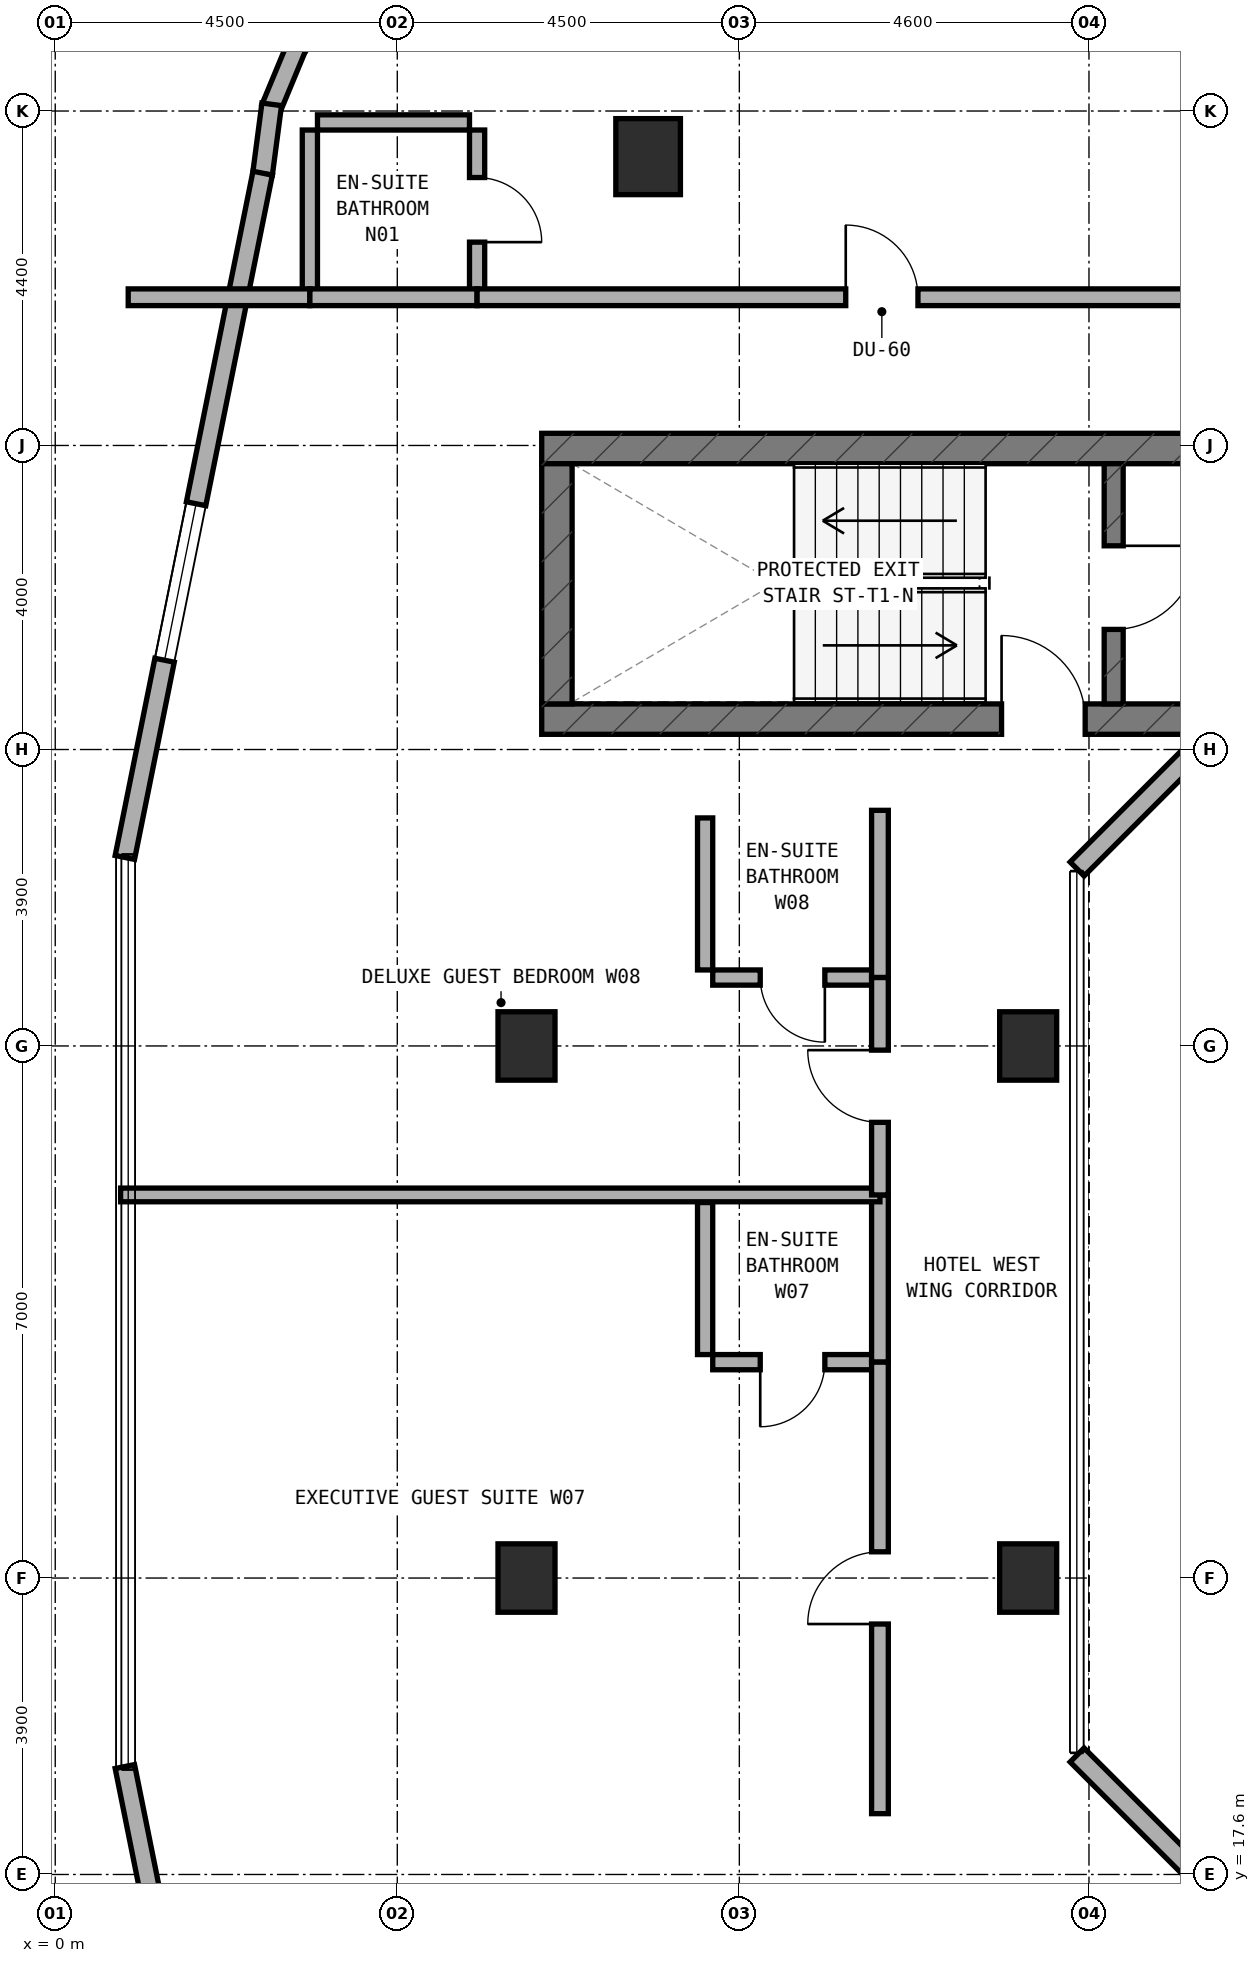
"""IFC4 building model, lengths in metres.
Left out: names, types, materials, properties, quantities, classifications, styles, units other than length and angle.
Written with IfcOpenShell. Run it as: python <this file> out.ifc"""

import sys

from ifc_helpers import new_model, si_unit, direction, frame, frame_2d, origin, origin_2d, place, context, subcontext, project, spatial, rectangle, extrude, element, fill, save


model = new_model("IFC4")
c1 = context("Model", 3, precision=1e-05, world=origin(), true_north=direction((0.0, 1.0)))
c2 = subcontext(c1, "Body", "Model", "MODEL_VIEW")
j1 = project(units=[si_unit("LENGTHUNIT", "METRE"), si_unit("PLANEANGLEUNIT", "RADIAN")], contexts=[c1])
p1 = place(None, origin())
s1 = spatial("IfcSite", under=j1, at=p1, CompositionType="ELEMENT")
p2 = place(p1, origin())
s2 = spatial("IfcBuilding", under=s1, at=p2, CompositionType="ELEMENT")
p3 = place(p2, frame((0.0, 0.0, 145.0)))
s3 = spatial("IfcBuildingStorey", under=s2, at=p3, CompositionType="ELEMENT", Elevation=145.0)
p4 = place(p3, frame((6.4, 32.8, 0.0), z_axis=(0.0, 0.0, 1.0), x_axis=(1.0, 0.0, 0.0)))
e1 = element("IfcWall", 1, at=p4, inside=s3, PredefinedType="SHEAR", context=c2, shape_type="SweptSolid", body=[
    extrude(rectangle(XDim=24.4, YDim=0.4, at=frame_2d((12.2, 0.0))), origin(), (0.0, 0.0, 1.0), 3.5),
])
p5 = place(p4, frame((6.05, 0.0, 0.0)))
e2 = element("IfcOpeningElement", 2, at=p5, cuts=e1, PredefinedType="OPENING", context=c2, shape_type="SweptSolid", body=[
    extrude(rectangle(XDim=1.1, YDim=2.15, at=frame_2d((0.55, 1.075))), frame((0.0, 0.21, 0.0), z_axis=(0.0, -1.0, 0.0), x_axis=(1.0, 0.0, 0.0)), (0.0, 0.0, 1.0), 0.42),
])
p6 = place(p3, frame((6.4, 36.36, 0.0), z_axis=(0.0, 0.0, 1.0), x_axis=(1.0, 0.0, 0.0)))
e3 = element("IfcWall", 3, at=p6, inside=s3, PredefinedType="SHEAR", context=c2, shape_type="SweptSolid", body=[
    extrude(rectangle(XDim=24.4, YDim=0.4, at=frame_2d((12.2, 0.0))), origin(), (0.0, 0.0, 1.0), 3.5),
])
p7 = place(p6, frame((9.15, 0.0, 0.0)))
e4 = element("IfcOpeningElement", 4, at=p7, cuts=e3, PredefinedType="OPENING", context=c2, shape_type="SweptSolid", body=[
    extrude(rectangle(XDim=1.2, YDim=2.15, at=frame_2d((0.6, 1.075))), frame((0.0, 0.21, 0.0), z_axis=(0.0, -1.0, 0.0), x_axis=(1.0, 0.0, 0.0)), (0.0, 0.0, 1.0), 0.42),
])
p8 = place(p6, frame((19.2, 0.0, 0.0)))
e5 = element("IfcOpeningElement", 5, at=p8, cuts=e3, PredefinedType="OPENING", context=c2, shape_type="SweptSolid", body=[
    extrude(rectangle(XDim=0.85, YDim=2.1, at=frame_2d((0.425, 1.05))), frame((0.0, 0.21, 0.0), z_axis=(0.0, -1.0, 0.0), x_axis=(1.0, 0.0, 0.0)), (0.0, 0.0, 1.0), 0.42),
])
p9 = place(p6, frame((17.22, 0.0, 0.0)))
e6 = element("IfcOpeningElement", 6, at=p9, cuts=e3, PredefinedType="OPENING", context=c2, shape_type="SweptSolid", body=[
    extrude(rectangle(XDim=0.85, YDim=2.1, at=frame_2d((0.425, 1.05))), frame((0.0, 0.21, 0.0), z_axis=(0.0, -1.0, 0.0), x_axis=(1.0, 0.0, 0.0)), (0.0, 0.0, 1.0), 0.42),
])
p10 = place(p3, frame((6.6, 33.0, 0.0), z_axis=(0.0, 0.0, 1.0), x_axis=(0.0, 1.0, 0.0)))
e7 = element("IfcWall", 7, at=p10, inside=s3, PredefinedType="SHEAR", context=c2, shape_type="SweptSolid", body=[
    extrude(rectangle(XDim=3.16, YDim=0.4, at=frame_2d((1.58, 0.0))), origin(), (0.0, 0.0, 1.0), 3.5),
])
p11 = place(p3, frame((13.925, 33.0, 0.0), z_axis=(0.0, 0.0, 1.0), x_axis=(0.0, 1.0, 0.0)))
e8 = element("IfcWall", 8, at=p11, inside=s3, PredefinedType="STANDARD", context=c2, shape_type="SweptSolid", body=[
    extrude(rectangle(XDim=3.16, YDim=0.25, at=frame_2d((1.58, 0.0))), origin(), (0.0, 0.0, 1.0), 3.22),
])
p12 = place(p11, frame((0.98, 0.0, 0.0)))
e9 = element("IfcOpeningElement", 9, at=p12, cuts=e8, PredefinedType="OPENING", context=c2, shape_type="SweptSolid", body=[
    extrude(rectangle(XDim=1.1, YDim=2.15, at=frame_2d((0.55, 1.075))), frame((0.0, 0.135, 0.0), z_axis=(0.0, -1.0, 0.0), x_axis=(1.0, 0.0, 0.0)), (0.0, 0.0, 1.0), 0.27),
])
for number, where, z_axis, x_axis in (
    (10, (6.2, 21.5, 0.0), (0.0, 0.0, 1.0), (1.0, 0.0, 0.0)),
    (11, (6.2, 28.5, 0.0), (0.0, 0.0, 1.0), (1.0, 0.0, 0.0)),
):
    element("IfcColumn", number, at=place(p3, frame(where, z_axis=z_axis, x_axis=x_axis)), inside=s3, PredefinedType="COLUMN", context=c2, shape_type="SweptSolid", body=[
        extrude(rectangle(XDim=0.75, YDim=0.9, at=origin_2d()), origin(), (0.0, 0.0, 1.0), 3.5),
    ])
p13 = place(p3, frame((7.8, 40.2, 0.0), z_axis=(0.0, 0.0, 1.0), x_axis=(1.0, 0.0, 0.0)))
e12 = element("IfcColumn", 12, at=p13, inside=s3, PredefinedType="COLUMN", context=c2, shape_type="SweptSolid", body=[
    extrude(rectangle(XDim=0.85, YDim=1.0, at=origin_2d()), origin(), (0.0, 0.0, 1.0), 3.5),
])
for number, where, z_axis, x_axis in (
    (13, (12.8, 21.5, 0.0), (0.0, 0.0, 1.0), (1.0, 0.0, 0.0)),
    (14, (12.8, 28.5, 0.0), (0.0, 0.0, 1.0), (1.0, 0.0, 0.0)),
):
    element("IfcColumn", number, at=place(p3, frame(where, z_axis=z_axis, x_axis=x_axis)), inside=s3, PredefinedType="COLUMN", context=c2, shape_type="SweptSolid", body=[
        extrude(rectangle(XDim=0.75, YDim=0.9, at=origin_2d()), origin(), (0.0, 0.0, 1.0), 3.5),
    ])
p14 = place(p3, frame((3.714, 42.345, 0.0), z_axis=(0.0, 0.0, 1.0), x_axis=(-0.608494022858, -0.793558456666, 0.0)))
e15 = element("IfcWall", 15, at=p14, inside=s3, PredefinedType="STANDARD", context=c2, shape_type="SweptSolid", body=[
    extrude(rectangle(XDim=0.902, YDim=0.26, at=frame_2d((0.451, 0.0))), origin(), (0.0, 0.0, 1.0), 3.22),
])
p15 = place(p3, frame((3.186, 41.673, 0.0), z_axis=(0.0, 0.0, 1.0), x_axis=(-0.383155708213, -0.923683767999, 0.0)))
e16 = element("IfcWall", 16, at=p15, inside=s3, PredefinedType="STANDARD", context=c2, shape_type="SweptSolid", body=[
    extrude(rectangle(XDim=0.903, YDim=0.26, at=frame_2d((0.451, 0.0))), origin(), (0.0, 0.0, 1.0), 3.22),
])
p16 = place(p3, frame((2.848, 40.888, 0.0), z_axis=(0.0, 0.0, 1.0), x_axis=(-0.130200706103, -0.991487658083, 0.0)))
e17 = element("IfcWall", 17, at=p16, inside=s3, PredefinedType="STANDARD", context=c2, shape_type="SweptSolid", body=[
    extrude(rectangle(XDim=0.921, YDim=0.26, at=frame_2d((0.46, 0.0))), origin(), (0.0, 0.0, 1.0), 3.22),
])
p17 = place(p3, frame((2.729, 39.982, 0.0), z_axis=(0.0, 0.0, 1.0), x_axis=(-0.197435082048, -0.980315963543, 0.0)))
e18 = element("IfcWall", 18, at=p17, inside=s3, PredefinedType="STANDARD", context=c2, shape_type="SweptSolid", body=[
    extrude(rectangle(XDim=9.183, YDim=0.26, at=frame_2d((4.591, 0.0))), origin(), (0.0, 0.0, 1.0), 3.22),
])
p18 = place(p17, frame((4.436, 0.0, 0.85)))
e19 = element("IfcOpeningElement", 19, at=p18, cuts=e18, PredefinedType="OPENING", context=c2, shape_type="SweptSolid", body=[
    extrude(rectangle(XDim=2.1, YDim=1.5, at=frame_2d((1.05, 0.75))), frame((0.0, 0.14, 0.0), z_axis=(0.0, -1.0, 0.0), x_axis=(1.0, 0.0, 0.0)), (0.0, 0.0, 1.0), 0.28),
])
p19 = place(p3, frame((0.916, 19.02, 0.0), z_axis=(0.0, 0.0, 1.0), x_axis=(0.197435082048, -0.980315963543, 0.0)))
e20 = element("IfcWall", 20, at=p19, inside=s3, PredefinedType="STANDARD", context=c2, shape_type="SweptSolid", body=[
    extrude(rectangle(XDim=9.183, YDim=0.26, at=frame_2d((4.591, 0.0))), origin(), (0.0, 0.0, 1.0), 3.22),
])
p20 = place(p19, frame((2.647, 0.0, 0.85)))
e21 = element("IfcOpeningElement", 21, at=p20, cuts=e20, PredefinedType="OPENING", context=c2, shape_type="SweptSolid", body=[
    extrude(rectangle(XDim=2.1, YDim=1.5, at=frame_2d((1.05, 0.75))), frame((0.0, 0.14, 0.0), z_axis=(0.0, -1.0, 0.0), x_axis=(1.0, 0.0, 0.0)), (0.0, 0.0, 1.0), 0.28),
])
for number, where, z_axis, x_axis in (
    (22, (15.278, 32.662, 0.0), (0.0, 0.0, 1.0), (-0.707, -0.707, 0.0)),
    (23, (13.444, 19.172, 0.0), (0.0, 0.0, 1.0), (0.707, -0.707, 0.0)),
):
    element("IfcWall", number, at=place(p3, frame(where, z_axis=z_axis, x_axis=x_axis)), inside=s3, PredefinedType="STANDARD", context=c2, shape_type="SweptSolid", body=[
        extrude(rectangle(XDim=2.594, YDim=0.26, at=frame_2d((1.297, 0.0))), origin(), (0.0, 0.0, 1.0), 3.22),
    ])
p21 = place(p3, frame((5.55, 38.45, 0.0), z_axis=(0.0, 0.0, 1.0), x_axis=(0.0, 1.0, 0.0)))
e24 = element("IfcWall", 24, at=p21, inside=s3, PredefinedType="PLUMBINGWALL", context=c2, shape_type="SweptSolid", body=[
    extrude(rectangle(XDim=2.1, YDim=0.2, at=frame_2d((1.05, 0.0))), origin(), (0.0, 0.0, 1.0), 3.22),
])
p22 = place(p21, frame((0.625, 0.0, 0.0)))
e25 = element("IfcOpeningElement", 25, at=p22, cuts=e24, PredefinedType="OPENING", context=c2, shape_type="SweptSolid", body=[
    extrude(rectangle(XDim=0.85, YDim=2.1, at=frame_2d((0.425, 1.05))), frame((0.0, 0.11, 0.0), z_axis=(0.0, -1.0, 0.0), x_axis=(1.0, 0.0, 0.0)), (0.0, 0.0, 1.0), 0.22),
])
p23 = place(p3, frame((3.45, 40.65, 0.0), z_axis=(0.0, 0.0, 1.0), x_axis=(1.0, 0.0, 0.0)))
e26 = element("IfcWall", 26, at=p23, inside=s3, PredefinedType="PLUMBINGWALL", context=c2, shape_type="SweptSolid", body=[
    extrude(rectangle(XDim=2.0, YDim=0.2, at=frame_2d((1.0, 0.0))), origin(), (0.0, 0.0, 1.0), 3.22),
])
p24 = place(p3, frame((3.35, 38.45, 0.0), z_axis=(0.0, 0.0, 1.0), x_axis=(0.0, 1.0, 0.0)))
e27 = element("IfcWall", 27, at=p24, inside=s3, PredefinedType="PLUMBINGWALL", context=c2, shape_type="SweptSolid", body=[
    extrude(rectangle(XDim=2.1, YDim=0.2, at=frame_2d((1.05, 0.0))), origin(), (0.0, 0.0, 1.0), 3.22),
])
p25 = place(p3, frame((0.96, 38.35, 0.0), z_axis=(0.0, 0.0, 1.0), x_axis=(1.0, 0.0, 0.0)))
e28 = element("IfcWall", 28, at=p25, inside=s3, PredefinedType="SOLIDWALL", context=c2, shape_type="SweptSolid", body=[
    extrude(rectangle(XDim=2.39, YDim=0.22, at=frame_2d((1.195, 0.0))), origin(), (0.0, 0.0, 1.0), 3.22),
])
p26 = place(p3, frame((3.35, 38.35, 0.0), z_axis=(0.0, 0.0, 1.0), x_axis=(1.0, 0.0, 0.0)))
e29 = element("IfcWall", 29, at=p26, inside=s3, PredefinedType="SOLIDWALL", context=c2, shape_type="SweptSolid", body=[
    extrude(rectangle(XDim=2.2, YDim=0.22, at=frame_2d((1.1, 0.0))), origin(), (0.0, 0.0, 1.0), 3.22),
])
p27 = place(p3, frame((5.55, 38.35, 0.0), z_axis=(0.0, 0.0, 1.0), x_axis=(1.0, 0.0, 0.0)))
e30 = element("IfcWall", 30, at=p27, inside=s3, PredefinedType="SOLIDWALL", context=c2, shape_type="SweptSolid", body=[
    extrude(rectangle(XDim=10.65, YDim=0.22, at=frame_2d((5.325, 0.0))), origin(), (0.0, 0.0, 1.0), 2.795),
])
p28 = place(p27, frame((4.85, 0.0, 0.0)))
e31 = element("IfcOpeningElement", 31, at=p28, cuts=e30, PredefinedType="OPENING", context=c2, shape_type="SweptSolid", body=[
    extrude(rectangle(XDim=0.95, YDim=2.1, at=frame_2d((0.475, 1.05))), frame((0.0, 0.12, 0.0), z_axis=(0.0, -1.0, 0.0), x_axis=(1.0, 0.0, 0.0)), (0.0, 0.0, 1.0), 0.24),
])
p29 = place(p3, frame((8.65, 24.34, 0.0), z_axis=(0.0, 0.0, 1.0), x_axis=(1.0, 0.0, 0.0)))
e32 = element("IfcWall", 32, at=p29, inside=s3, PredefinedType="PLUMBINGWALL", context=c2, shape_type="SweptSolid", body=[
    extrude(rectangle(XDim=2.1, YDim=0.2, at=frame_2d((1.05, 0.0))), origin(), (0.0, 0.0, 1.0), 3.22),
])
p30 = place(p29, frame((0.625, 0.0, 0.0)))
e33 = element("IfcOpeningElement", 33, at=p30, cuts=e32, PredefinedType="OPENING", context=c2, shape_type="SweptSolid", body=[
    extrude(rectangle(XDim=0.85, YDim=2.1, at=frame_2d((0.425, 1.05))), frame((0.0, 0.11, 0.0), z_axis=(0.0, -1.0, 0.0), x_axis=(1.0, 0.0, 0.0)), (0.0, 0.0, 1.0), 0.22),
])
p31 = place(p3, frame((8.55, 24.44, 0.0), z_axis=(0.0, 0.0, 1.0), x_axis=(0.0, 1.0, 0.0)))
e34 = element("IfcWall", 34, at=p31, inside=s3, PredefinedType="PLUMBINGWALL", context=c2, shape_type="SweptSolid", body=[
    extrude(rectangle(XDim=2.0, YDim=0.2, at=frame_2d((1.0, 0.0))), origin(), (0.0, 0.0, 1.0), 3.22),
])
p32 = place(p3, frame((10.85, 24.34, 0.0), z_axis=(0.0, 0.0, 1.0), x_axis=(0.0, 1.0, 0.0)))
e35 = element("IfcWall", 35, at=p32, inside=s3, PredefinedType="SOLIDWALL", context=c2, shape_type="SweptSolid", body=[
    extrude(rectangle(XDim=2.2, YDim=0.22, at=frame_2d((1.1, 0.0))), origin(), (0.0, 0.0, 1.0), 3.22),
])
p33 = place(p3, frame((10.85, 18.4, 0.0), z_axis=(0.0, 0.0, 1.0), x_axis=(0.0, 1.0, 0.0)))
e36 = element("IfcWall", 36, at=p33, inside=s3, PredefinedType="SOLIDWALL", context=c2, shape_type="SweptSolid", body=[
    extrude(rectangle(XDim=5.94, YDim=0.22, at=frame_2d((2.97, 0.0))), origin(), (0.0, 0.0, 1.0), 2.795),
])
p34 = place(p33, frame((2.495, 0.0, 0.0)))
e37 = element("IfcOpeningElement", 37, at=p34, cuts=e36, PredefinedType="OPENING", context=c2, shape_type="SweptSolid", body=[
    extrude(rectangle(XDim=0.95, YDim=2.1, at=frame_2d((0.475, 1.05))), frame((0.0, 0.12, 0.0), z_axis=(0.0, -1.0, 0.0), x_axis=(1.0, 0.0, 0.0)), (0.0, 0.0, 1.0), 0.24),
])
p35 = place(p3, frame((0.86, 26.54, 0.0), z_axis=(0.0, 0.0, 1.0), x_axis=(1.0, 0.0, 0.0)))
e38 = element("IfcWall", 38, at=p35, inside=s3, PredefinedType="SOLIDWALL", context=c2, shape_type="SweptSolid", body=[
    extrude(rectangle(XDim=9.99, YDim=0.18, at=frame_2d((4.995, 0.0))), origin(), (0.0, 0.0, 1.0), 2.835),
])
p36 = place(p3, frame((8.65, 29.4, 0.0), z_axis=(0.0, 0.0, 1.0), x_axis=(1.0, 0.0, 0.0)))
e39 = element("IfcWall", 39, at=p36, inside=s3, PredefinedType="PLUMBINGWALL", context=c2, shape_type="SweptSolid", body=[
    extrude(rectangle(XDim=2.1, YDim=0.2, at=frame_2d((1.05, 0.0))), origin(), (0.0, 0.0, 1.0), 3.22),
])
p37 = place(p36, frame((0.625, 0.0, 0.0)))
e40 = element("IfcOpeningElement", 40, at=p37, cuts=e39, PredefinedType="OPENING", context=c2, shape_type="SweptSolid", body=[
    extrude(rectangle(XDim=0.85, YDim=2.1, at=frame_2d((0.425, 1.05))), frame((0.0, 0.11, 0.0), z_axis=(0.0, -1.0, 0.0), x_axis=(1.0, 0.0, 0.0)), (0.0, 0.0, 1.0), 0.22),
])
p38 = place(p3, frame((8.55, 29.5, 0.0), z_axis=(0.0, 0.0, 1.0), x_axis=(0.0, 1.0, 0.0)))
e41 = element("IfcWall", 41, at=p38, inside=s3, PredefinedType="PLUMBINGWALL", context=c2, shape_type="SweptSolid", body=[
    extrude(rectangle(XDim=2.0, YDim=0.2, at=frame_2d((1.0, 0.0))), origin(), (0.0, 0.0, 1.0), 3.22),
])
p39 = place(p3, frame((10.85, 29.4, 0.0), z_axis=(0.0, 0.0, 1.0), x_axis=(0.0, 1.0, 0.0)))
e42 = element("IfcWall", 42, at=p39, inside=s3, PredefinedType="SOLIDWALL", context=c2, shape_type="SweptSolid", body=[
    extrude(rectangle(XDim=2.2, YDim=0.22, at=frame_2d((1.1, 0.0))), origin(), (0.0, 0.0, 1.0), 3.22),
])
p40 = place(p3, frame((10.85, 26.54, 0.0), z_axis=(0.0, 0.0, 1.0), x_axis=(0.0, 1.0, 0.0)))
e43 = element("IfcWall", 43, at=p40, inside=s3, PredefinedType="SOLIDWALL", context=c2, shape_type="SweptSolid", body=[
    extrude(rectangle(XDim=2.86, YDim=0.22, at=frame_2d((1.43, 0.0))), origin(), (0.0, 0.0, 1.0), 2.795),
])
p41 = place(p40, frame((0.955, 0.0, 0.0)))
e44 = element("IfcOpeningElement", 44, at=p41, cuts=e43, PredefinedType="OPENING", context=c2, shape_type="SweptSolid", body=[
    extrude(rectangle(XDim=0.95, YDim=2.1, at=frame_2d((0.475, 1.05))), frame((0.0, 0.12, 0.0), z_axis=(0.0, -1.0, 0.0), x_axis=(1.0, 0.0, 0.0)), (0.0, 0.0, 1.0), 0.24),
])
p42 = place(p18, origin())
e45 = element("IfcWindow", 45, at=p42, inside=s3, PartitioningType="SINGLE_PANEL", PredefinedType="WINDOW", context=c2, shape_type="SweptSolid", body=[
    extrude(rectangle(XDim=2.1, YDim=1.5, at=frame_2d((1.05, 0.75))), frame((0.0, 0.03, 0.0), z_axis=(0.0, -1.0, 0.0), x_axis=(1.0, 0.0, 0.0)), (0.0, 0.0, 1.0), 0.06),
])
fill(e19, e45)
p43 = place(p12, frame((1.1, 0.0, 0.0), z_axis=(0.0, 0.0, 1.0), x_axis=(-1.0, 0.0, 0.0)))
e46 = element("IfcDoor", 46, at=p43, inside=s3, OperationType="SINGLE_SWING_LEFT", PredefinedType="DOOR", context=c2, shape_type="SweptSolid", body=[
    extrude(rectangle(XDim=1.1, YDim=2.15, at=frame_2d((0.55, 1.075))), frame((0.0, 0.025, 0.0), z_axis=(0.0, -1.0, 0.0), x_axis=(1.0, 0.0, 0.0)), (0.0, 0.0, 1.0), 0.05),
])
fill(e9, e46)
p44 = place(p5, origin())
e47 = element("IfcDoor", 47, at=p44, inside=s3, OperationType="SINGLE_SWING_LEFT", PredefinedType="DOOR", context=c2, shape_type="SweptSolid", body=[
    extrude(rectangle(XDim=1.1, YDim=2.15, at=frame_2d((0.55, 1.075))), frame((0.0, 0.025, 0.0), z_axis=(0.0, -1.0, 0.0), x_axis=(1.0, 0.0, 0.0)), (0.0, 0.0, 1.0), 0.05),
])
fill(e2, e47)
p45 = place(p22, frame((0.85, 0.0, 0.0), z_axis=(0.0, 0.0, 1.0), x_axis=(-1.0, 0.0, 0.0)))
e48 = element("IfcDoor", 48, at=p45, inside=s3, OperationType="SINGLE_SWING_RIGHT", PredefinedType="DOOR", context=c2, shape_type="SweptSolid", body=[
    extrude(rectangle(XDim=0.85, YDim=2.1, at=frame_2d((0.425, 1.05))), frame((0.0, 0.025, 0.0), z_axis=(0.0, -1.0, 0.0), x_axis=(1.0, 0.0, 0.0)), (0.0, 0.0, 1.0), 0.05),
])
fill(e25, e48)
p46 = place(p28, origin())
e49 = element("IfcDoor", 49, at=p46, inside=s3, OperationType="SINGLE_SWING_LEFT", PredefinedType="DOOR", context=c2, shape_type="SweptSolid", body=[
    extrude(rectangle(XDim=0.95, YDim=2.1, at=frame_2d((0.475, 1.05))), frame((0.0, 0.025, 0.0), z_axis=(0.0, -1.0, 0.0), x_axis=(1.0, 0.0, 0.0)), (0.0, 0.0, 1.0), 0.05),
])
fill(e31, e49)
p47 = place(p30, frame((0.85, 0.0, 0.0), z_axis=(0.0, 0.0, 1.0), x_axis=(-1.0, 0.0, 0.0)))
e50 = element("IfcDoor", 50, at=p47, inside=s3, OperationType="SINGLE_SWING_RIGHT", PredefinedType="DOOR", context=c2, shape_type="SweptSolid", body=[
    extrude(rectangle(XDim=0.85, YDim=2.1, at=frame_2d((0.425, 1.05))), frame((0.0, 0.025, 0.0), z_axis=(0.0, -1.0, 0.0), x_axis=(1.0, 0.0, 0.0)), (0.0, 0.0, 1.0), 0.05),
])
fill(e33, e50)
p48 = place(p34, origin())
e51 = element("IfcDoor", 51, at=p48, inside=s3, OperationType="SINGLE_SWING_LEFT", PredefinedType="DOOR", context=c2, shape_type="SweptSolid", body=[
    extrude(rectangle(XDim=0.95, YDim=2.1, at=frame_2d((0.475, 1.05))), frame((0.0, 0.025, 0.0), z_axis=(0.0, -1.0, 0.0), x_axis=(1.0, 0.0, 0.0)), (0.0, 0.0, 1.0), 0.05),
])
fill(e37, e51)
p49 = place(p37, frame((0.85, 0.0, 0.0), z_axis=(0.0, 0.0, 1.0), x_axis=(-1.0, 0.0, 0.0)))
e52 = element("IfcDoor", 52, at=p49, inside=s3, OperationType="SINGLE_SWING_LEFT", PredefinedType="DOOR", context=c2, shape_type="SweptSolid", body=[
    extrude(rectangle(XDim=0.85, YDim=2.1, at=frame_2d((0.425, 1.05))), frame((0.0, 0.025, 0.0), z_axis=(0.0, -1.0, 0.0), x_axis=(1.0, 0.0, 0.0)), (0.0, 0.0, 1.0), 0.05),
])
fill(e40, e52)
p50 = place(p41, origin())
e53 = element("IfcDoor", 53, at=p50, inside=s3, OperationType="SINGLE_SWING_RIGHT", PredefinedType="DOOR", context=c2, shape_type="SweptSolid", body=[
    extrude(rectangle(XDim=0.95, YDim=2.1, at=frame_2d((0.475, 1.05))), frame((0.0, 0.025, 0.0), z_axis=(0.0, -1.0, 0.0), x_axis=(1.0, 0.0, 0.0)), (0.0, 0.0, 1.0), 0.05),
])
fill(e44, e53)
save(model, sys.argv[1])
